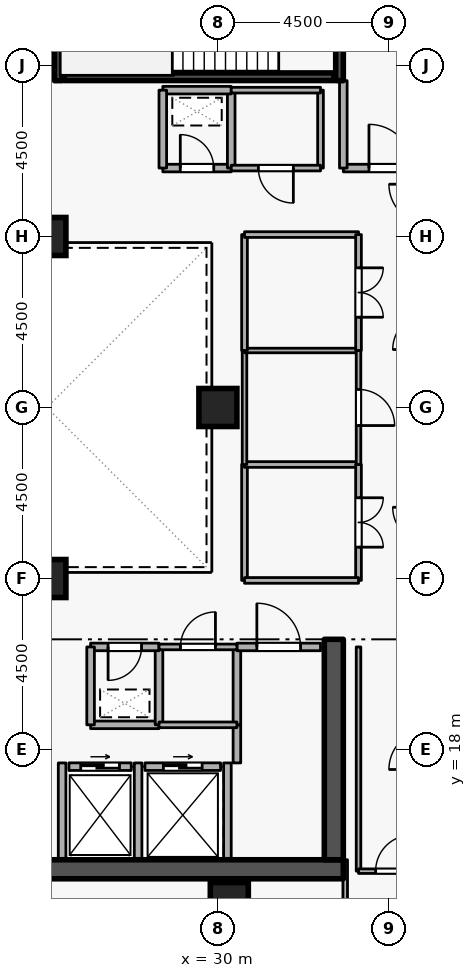
"""IFC4 building model, lengths in metres.
Left out: names, types, materials, properties, quantities, classifications, styles, units other than length and angle.
Written with IfcOpenShell. Run it as: python <this file> out.ifc"""

import sys

from ifc_helpers import new_model, si_unit, direction, frame, frame_2d, origin, origin_2d, place, context, subcontext, project, spatial, rectangle, extrude, element, fill, save


model = new_model("IFC4")
c1 = context("Model", 3, precision=1e-05, world=origin(), true_north=direction((0.0, 1.0)))
c2 = subcontext(c1, "Body", "Model", "MODEL_VIEW")
j1 = project(units=[si_unit("LENGTHUNIT", "METRE"), si_unit("PLANEANGLEUNIT", "RADIAN")], contexts=[c1])
p1 = place(None, origin())
s1 = spatial("IfcSite", under=j1, at=p1, CompositionType="ELEMENT")
p2 = place(p1, origin())
s2 = spatial("IfcBuilding", under=s1, at=p2, CompositionType="ELEMENT")
p3 = place(p2, frame((0.0, 0.0, 247.5)))
s3 = spatial("IfcBuildingStorey", under=s2, at=p3, CompositionType="ELEMENT", Elevation=247.5)
p4 = place(p3, frame((17.7, 14.85, 0.0), z_axis=(0.0, 0.0, 1.0), x_axis=(1.0, 0.0, 0.0)))
e1 = element("IfcWall", 1, at=p4, inside=s3, PredefinedType="SHEAR", context=c2, shape_type="SweptSolid", body=[
    extrude(rectangle(XDim=15.6, YDim=0.5, at=frame_2d((7.8, 0.0))), origin(), (0.0, 0.0, 1.0), 3.6),
])
p5 = place(p3, frame((33.05, 15.1, 0.0), z_axis=(0.0, 0.0, 1.0), x_axis=(0.0, 1.0, 0.0)))
e2 = element("IfcWall", 2, at=p5, inside=s3, PredefinedType="SHEAR", context=c2, shape_type="SweptSolid", body=[
    extrude(rectangle(XDim=5.8, YDim=0.5, at=frame_2d((2.9, 0.0))), origin(), (0.0, 0.0, 1.0), 3.6),
])
for number, where, z_axis, x_axis in (
    (3, (30.3, 14.0, 0.0), (0.0, 0.0, 1.0), (1.0, 0.0, 0.0)),
    (4, (25.5, 22.5, 0.0), (0.0, 0.0, 1.0), (1.0, 0.0, 0.0)),
    (5, (25.5, 31.5, 0.0), (0.0, 0.0, 1.0), (1.0, 0.0, 0.0)),
    (6, (30.0, 27.0, 0.0), (0.0, 0.0, 1.0), (1.0, 0.0, 0.0)),
):
    element("IfcColumn", number, at=place(p3, frame(where, z_axis=z_axis, x_axis=x_axis)), inside=s3, PredefinedType="COLUMN", context=c2, shape_type="SweptSolid", body=[
        extrude(rectangle(XDim=1.0, YDim=1.0, at=origin_2d()), origin(), (0.0, 0.0, 1.0), 3.6),
    ])
p6 = place(p3, frame((26.08, 17.55, 0.0), z_axis=(0.0, 0.0, 1.0), x_axis=(1.0, 0.0, 0.0)))
e7 = element("IfcWall", 7, at=p6, inside=s3, PredefinedType="STANDARD", context=c2, shape_type="SweptSolid", body=[
    extrude(rectangle(XDim=1.64, YDim=0.2, at=frame_2d((0.82, 0.0))), origin(), (0.0, 0.0, 1.0), 3.34),
])
p7 = place(p6, frame((0.31, 0.0, 0.0)))
e8 = element("IfcOpeningElement", 8, at=p7, cuts=e7, PredefinedType="OPENING", context=c2, shape_type="SweptSolid", body=[
    extrude(rectangle(XDim=1.02, YDim=2.06, at=frame_2d((0.51, 1.03))), frame((0.0, 0.11, 0.0), z_axis=(0.0, -1.0, 0.0), x_axis=(1.0, 0.0, 0.0)), (0.0, 0.0, 1.0), 0.22),
])
p8 = place(p3, frame((28.08, 17.55, 0.0), z_axis=(0.0, 0.0, 1.0), x_axis=(1.0, 0.0, 0.0)))
e9 = element("IfcWall", 9, at=p8, inside=s3, PredefinedType="STANDARD", context=c2, shape_type="SweptSolid", body=[
    extrude(rectangle(XDim=1.99, YDim=0.2, at=frame_2d((0.995, 0.0))), origin(), (0.0, 0.0, 1.0), 3.34),
])
p9 = place(p8, frame((0.485, 0.0, 0.0)))
e10 = element("IfcOpeningElement", 10, at=p9, cuts=e9, PredefinedType="OPENING", context=c2, shape_type="SweptSolid", body=[
    extrude(rectangle(XDim=1.02, YDim=2.06, at=frame_2d((0.51, 1.03))), frame((0.0, 0.11, 0.0), z_axis=(0.0, -1.0, 0.0), x_axis=(1.0, 0.0, 0.0)), (0.0, 0.0, 1.0), 0.22),
])
for number, where, z_axis, x_axis in (
    (11, (27.9, 15.112, 0.0), (0.0, 0.0, 1.0), (0.0, 1.0, 0.0)),
    (12, (25.9, 15.112, 0.0), (0.0, 0.0, 1.0), (0.0, 1.0, 0.0)),
    (13, (30.25, 15.112, 0.0), (0.0, 0.0, 1.0), (0.0, 1.0, 0.0)),
):
    element("IfcWall", number, at=place(p3, frame(where, z_axis=z_axis, x_axis=x_axis)), inside=s3, PredefinedType="STANDARD", context=c2, shape_type="SweptSolid", body=[
        extrude(rectangle(XDim=2.536, YDim=0.2, at=frame_2d((1.268, 0.0))), origin(), (0.0, 0.0, 1.0), 3.34),
    ])
p10 = place(p3, frame((33.2, 38.95, 0.0), z_axis=(0.0, 0.0, 1.0), x_axis=(0.0, -1.0, 0.0)))
e14 = element("IfcWall", 14, at=p10, inside=s3, PredefinedType="SHEAR", context=c2, shape_type="SweptSolid", body=[
    extrude(rectangle(XDim=3.35, YDim=0.2, at=frame_2d((1.675, 0.0))), origin(), (0.0, 0.0, 1.0), 3.6),
])
p11 = place(p10, frame((1.125, 0.0, 0.0)))
e15 = element("IfcOpeningElement", 15, at=p11, cuts=e14, PredefinedType="OPENING", context=c2, shape_type="SweptSolid", body=[
    extrude(rectangle(XDim=1.1, YDim=2.1, at=frame_2d((0.55, 1.05))), frame((0.0, 0.11, 0.0), z_axis=(0.0, -1.0, 0.0), x_axis=(1.0, 0.0, 0.0)), (0.0, 0.0, 1.0), 0.22),
])
p12 = place(p3, frame((25.8, 35.6, 0.0), z_axis=(0.0, 0.0, 1.0), x_axis=(0.0, 1.0, 0.0)))
e16 = element("IfcWall", 16, at=p12, inside=s3, PredefinedType="SHEAR", context=c2, shape_type="SweptSolid", body=[
    extrude(rectangle(XDim=3.35, YDim=0.2, at=frame_2d((1.675, 0.0))), origin(), (0.0, 0.0, 1.0), 3.6),
])
p13 = place(p3, frame((25.95, 35.703, 0.0), z_axis=(0.0, 0.0, 1.0), x_axis=(1.0, 0.0, 0.0)))
e17 = element("IfcWall", 17, at=p13, inside=s3, PredefinedType="SHEAR", context=c2, shape_type="SweptSolid", body=[
    extrude(rectangle(XDim=7.1, YDim=0.2, at=frame_2d((3.55, 0.0))), origin(), (0.0, 0.0, 1.0), 3.6),
])
p14 = place(p3, frame((33.3, 33.3, 0.0), z_axis=(0.0, 0.0, 1.0), x_axis=(1.0, 0.0, 0.0)))
e18 = element("IfcWall", 18, at=p14, inside=s3, PredefinedType="STANDARD", context=c2, shape_type="SweptSolid", body=[
    extrude(rectangle(XDim=2.5, YDim=0.2, at=frame_2d((1.25, 0.0))), origin(), (0.0, 0.0, 1.0), 3.34),
])
p15 = place(p14, frame((0.675, 0.0, 0.0)))
e19 = element("IfcOpeningElement", 19, at=p15, cuts=e18, PredefinedType="OPENING", context=c2, shape_type="SweptSolid", body=[
    extrude(rectangle(XDim=1.15, YDim=2.1, at=frame_2d((0.575, 1.05))), frame((0.0, 0.11, 0.0), z_axis=(0.0, -1.0, 0.0), x_axis=(1.0, 0.0, 0.0)), (0.0, 0.0, 1.0), 0.22),
])
p16 = place(p3, frame((33.3, 35.6, 0.0), z_axis=(0.0, 0.0, 1.0), x_axis=(0.0, -1.0, 0.0)))
e20 = element("IfcWall", 20, at=p16, inside=s3, PredefinedType="STANDARD", context=c2, shape_type="SweptSolid", body=[
    extrude(rectangle(XDim=2.3, YDim=0.2, at=frame_2d((1.15, 0.0))), origin(), (0.0, 0.0, 1.0), 2.545),
])
p17 = place(p3, frame((26.65, 18.65, 0.0), z_axis=(0.0, 0.0, 1.0), x_axis=(1.0, 0.0, 0.0)))
e21 = element("IfcWall", 21, at=p17, inside=s3, PredefinedType="STANDARD", context=c2, shape_type="SweptSolid", body=[
    extrude(rectangle(XDim=1.8, YDim=0.2, at=frame_2d((0.9, 0.0))), origin(), (0.0, 0.0, 1.0), 3.34),
])
p18 = place(p3, frame((28.45, 18.65, 0.0), z_axis=(0.0, 0.0, 1.0), x_axis=(0.0, 1.0, 0.0)))
e22 = element("IfcWall", 22, at=p18, inside=s3, PredefinedType="STANDARD", context=c2, shape_type="SweptSolid", body=[
    extrude(rectangle(XDim=2.05, YDim=0.2, at=frame_2d((1.025, 0.0))), origin(), (0.0, 0.0, 1.0), 3.34),
])
p19 = place(p3, frame((28.45, 20.7, 0.0), z_axis=(0.0, 0.0, 1.0), x_axis=(-1.0, 0.0, 0.0)))
e23 = element("IfcWall", 23, at=p19, inside=s3, PredefinedType="STANDARD", context=c2, shape_type="SweptSolid", body=[
    extrude(rectangle(XDim=1.8, YDim=0.2, at=frame_2d((0.9, 0.0))), origin(), (0.0, 0.0, 1.0), 3.34),
])
p20 = place(p19, frame((0.46, 0.0, 0.0)))
e24 = element("IfcOpeningElement", 24, at=p20, cuts=e23, PredefinedType="OPENING", context=c2, shape_type="SweptSolid", body=[
    extrude(rectangle(XDim=0.88, YDim=2.04, at=frame_2d((0.44, 1.02))), frame((0.0, 0.11, 0.0), z_axis=(0.0, -1.0, 0.0), x_axis=(1.0, 0.0, 0.0)), (0.0, 0.0, 1.0), 0.22),
])
p21 = place(p3, frame((26.65, 20.7, 0.0), z_axis=(0.0, 0.0, 1.0), x_axis=(0.0, -1.0, 0.0)))
e25 = element("IfcWall", 25, at=p21, inside=s3, PredefinedType="STANDARD", context=c2, shape_type="SweptSolid", body=[
    extrude(rectangle(XDim=2.05, YDim=0.2, at=frame_2d((1.025, 0.0))), origin(), (0.0, 0.0, 1.0), 3.34),
])
p22 = place(p3, frame((28.55, 33.3, 0.0), z_axis=(0.0, 0.0, 1.0), x_axis=(1.0, 0.0, 0.0)))
e26 = element("IfcWall", 26, at=p22, inside=s3, PredefinedType="STANDARD", context=c2, shape_type="SweptSolid", body=[
    extrude(rectangle(XDim=1.8, YDim=0.2, at=frame_2d((0.9, 0.0))), origin(), (0.0, 0.0, 1.0), 3.34),
])
p23 = place(p22, frame((0.46, 0.0, 0.0)))
e27 = element("IfcOpeningElement", 27, at=p23, cuts=e26, PredefinedType="OPENING", context=c2, shape_type="SweptSolid", body=[
    extrude(rectangle(XDim=0.88, YDim=2.04, at=frame_2d((0.44, 1.02))), frame((0.0, 0.11, 0.0), z_axis=(0.0, -1.0, 0.0), x_axis=(1.0, 0.0, 0.0)), (0.0, 0.0, 1.0), 0.22),
])
p24 = place(p3, frame((30.35, 33.3, 0.0), z_axis=(0.0, 0.0, 1.0), x_axis=(0.0, 1.0, 0.0)))
e28 = element("IfcWall", 28, at=p24, inside=s3, PredefinedType="STANDARD", context=c2, shape_type="SweptSolid", body=[
    extrude(rectangle(XDim=2.05, YDim=0.2, at=frame_2d((1.025, 0.0))), origin(), (0.0, 0.0, 1.0), 3.34),
])
p25 = place(p3, frame((30.35, 35.35, 0.0), z_axis=(0.0, 0.0, 1.0), x_axis=(-1.0, 0.0, 0.0)))
e29 = element("IfcWall", 29, at=p25, inside=s3, PredefinedType="STANDARD", context=c2, shape_type="SweptSolid", body=[
    extrude(rectangle(XDim=1.8, YDim=0.2, at=frame_2d((0.9, 0.0))), origin(), (0.0, 0.0, 1.0), 3.34),
])
p26 = place(p3, frame((28.55, 35.35, 0.0), z_axis=(0.0, 0.0, 1.0), x_axis=(0.0, -1.0, 0.0)))
e30 = element("IfcWall", 30, at=p26, inside=s3, PredefinedType="STANDARD", context=c2, shape_type="SweptSolid", body=[
    extrude(rectangle(XDim=2.05, YDim=0.2, at=frame_2d((1.025, 0.0))), origin(), (0.0, 0.0, 1.0), 3.34),
])
p27 = place(p3, frame((30.5, 17.648, 0.0), z_axis=(0.0, 0.0, 1.0), x_axis=(0.0, 1.0, 0.0)))
e31 = element("IfcWall", 31, at=p27, inside=s3, PredefinedType="STANDARD", context=c2, shape_type="SweptSolid", body=[
    extrude(rectangle(XDim=1.002, YDim=0.2, at=frame_2d((0.501, 0.0))), origin(), (0.0, 0.0, 1.0), 3.34),
])
p28 = place(p3, frame((30.5, 18.65, 0.0), z_axis=(0.0, 0.0, 1.0), x_axis=(0.0, 1.0, 0.0)))
e32 = element("IfcWall", 32, at=p28, inside=s3, PredefinedType="STANDARD", context=c2, shape_type="SweptSolid", body=[
    extrude(rectangle(XDim=2.05, YDim=0.2, at=frame_2d((1.025, 0.0))), origin(), (0.0, 0.0, 1.0), 3.34),
])
p29 = place(p3, frame((30.5, 20.7, 0.0), z_axis=(0.0, 0.0, 1.0), x_axis=(1.0, 0.0, 0.0)))
e33 = element("IfcWall", 33, at=p29, inside=s3, PredefinedType="STANDARD", context=c2, shape_type="SweptSolid", body=[
    extrude(rectangle(XDim=2.2, YDim=0.2, at=frame_2d((1.1, 0.0))), origin(), (0.0, 0.0, 1.0), 3.34),
])
p30 = place(p29, frame((0.525, 0.0, 0.0)))
e34 = element("IfcOpeningElement", 34, at=p30, cuts=e33, PredefinedType="OPENING", context=c2, shape_type="SweptSolid", body=[
    extrude(rectangle(XDim=1.15, YDim=2.1, at=frame_2d((0.575, 1.05))), frame((0.0, 0.11, 0.0), z_axis=(0.0, -1.0, 0.0), x_axis=(1.0, 0.0, 0.0)), (0.0, 0.0, 1.0), 0.22),
])
p31 = place(p3, frame((30.5, 18.65, 0.0), z_axis=(0.0, 0.0, 1.0), x_axis=(-1.0, 0.0, 0.0)))
e35 = element("IfcWall", 35, at=p31, inside=s3, PredefinedType="PARTITIONING", context=c2, shape_type="SweptSolid", body=[
    extrude(rectangle(XDim=2.05, YDim=0.15, at=frame_2d((1.025, 0.0))), origin(), (0.0, 0.0, 1.0), 3.34),
])
p32 = place(p3, frame((28.45, 20.7, 0.0), z_axis=(0.0, 0.0, 1.0), x_axis=(1.0, 0.0, 0.0)))
e36 = element("IfcWall", 36, at=p32, inside=s3, PredefinedType="PARTITIONING", context=c2, shape_type="SweptSolid", body=[
    extrude(rectangle(XDim=2.05, YDim=0.15, at=frame_2d((1.025, 0.0))), origin(), (0.0, 0.0, 1.0), 3.34),
])
p33 = place(p32, frame((0.565, 0.0, 0.0)))
e37 = element("IfcOpeningElement", 37, at=p33, cuts=e36, PredefinedType="OPENING", context=c2, shape_type="SweptSolid", body=[
    extrude(rectangle(XDim=0.92, YDim=2.08, at=frame_2d((0.46, 1.04))), frame((0.0, 0.085, 0.0), z_axis=(0.0, -1.0, 0.0), x_axis=(1.0, 0.0, 0.0)), (0.0, 0.0, 1.0), 0.17),
])
p34 = place(p3, frame((32.7, 35.35, 0.0), z_axis=(0.0, 0.0, 1.0), x_axis=(0.0, -1.0, 0.0)))
e38 = element("IfcWall", 38, at=p34, inside=s3, PredefinedType="PARTITIONING", context=c2, shape_type="SweptSolid", body=[
    extrude(rectangle(XDim=2.05, YDim=0.15, at=frame_2d((1.025, 0.0))), origin(), (0.0, 0.0, 1.0), 2.545),
])
p35 = place(p3, frame((32.7, 33.3, 0.0), z_axis=(0.0, 0.0, 1.0), x_axis=(-1.0, 0.0, 0.0)))
e39 = element("IfcWall", 39, at=p35, inside=s3, PredefinedType="PARTITIONING", context=c2, shape_type="SweptSolid", body=[
    extrude(rectangle(XDim=2.35, YDim=0.15, at=frame_2d((1.175, 0.0))), origin(), (0.0, 0.0, 1.0), 3.34),
])
p36 = place(p35, frame((0.715, 0.0, 0.0)))
e40 = element("IfcOpeningElement", 40, at=p36, cuts=e39, PredefinedType="OPENING", context=c2, shape_type="SweptSolid", body=[
    extrude(rectangle(XDim=0.92, YDim=2.08, at=frame_2d((0.46, 1.04))), frame((0.0, 0.085, 0.0), z_axis=(0.0, -1.0, 0.0), x_axis=(1.0, 0.0, 0.0)), (0.0, 0.0, 1.0), 0.17),
])
p37 = place(p3, frame((30.35, 35.35, 0.0), z_axis=(0.0, 0.0, 1.0), x_axis=(1.0, 0.0, 0.0)))
e41 = element("IfcWall", 41, at=p37, inside=s3, PredefinedType="PARTITIONING", context=c2, shape_type="SweptSolid", body=[
    extrude(rectangle(XDim=2.35, YDim=0.15, at=frame_2d((1.175, 0.0))), origin(), (0.0, 0.0, 1.0), 3.34),
])
p38 = place(p3, frame((33.7, 20.7, 0.0), z_axis=(0.0, 0.0, 1.0), x_axis=(0.0, -1.0, 0.0)))
e42 = element("IfcWall", 42, at=p38, inside=s3, PredefinedType="PARTITIONING", context=c2, shape_type="SweptSolid", body=[
    extrude(rectangle(XDim=5.9, YDim=0.12, at=frame_2d((2.95, 0.0))), origin(), (0.0, 0.0, 1.0), 3.34),
])
p39 = place(p3, frame((33.7, 14.8, 0.0), z_axis=(0.0, 0.0, 1.0), x_axis=(1.0, 0.0, 0.0)))
e43 = element("IfcWall", 43, at=p39, inside=s3, PredefinedType="PARTITIONING", context=c2, shape_type="SweptSolid", body=[
    extrude(rectangle(XDim=1.85, YDim=0.12, at=frame_2d((0.925, 0.0))), origin(), (0.0, 0.0, 1.0), 3.34),
])
p40 = place(p39, frame((0.45, 0.0, 0.0)))
e44 = element("IfcOpeningElement", 44, at=p40, cuts=e43, PredefinedType="OPENING", context=c2, shape_type="SweptSolid", body=[
    extrude(rectangle(XDim=0.95, YDim=2.1, at=frame_2d((0.475, 1.05))), frame((0.0, 0.07, 0.0), z_axis=(0.0, -1.0, 0.0), x_axis=(1.0, 0.0, 0.0)), (0.0, 0.0, 1.0), 0.14),
])
p41 = place(p3, frame((33.35, 3.28, 0.0), z_axis=(0.0, 0.0, 1.0), x_axis=(0.0, 1.0, 0.0)))
e45 = element("IfcWall", 45, at=p41, inside=s3, PredefinedType="PARTITIONING", context=c2, shape_type="SweptSolid", body=[
    extrude(rectangle(XDim=11.82, YDim=0.12, at=frame_2d((5.91, 0.0))), origin(), (0.0, 0.0, 1.0), 2.545),
])
p42 = place(p3, frame((30.7, 22.45, 0.0), z_axis=(0.0, 0.0, 1.0), x_axis=(0.0, 1.0, 0.0)))
e46 = element("IfcWall", 46, at=p42, inside=s3, PredefinedType="PARTITIONING", context=c2, shape_type="SweptSolid", body=[
    extrude(rectangle(XDim=3.05, YDim=0.15, at=frame_2d((1.525, 0.0))), origin(), (0.0, 0.0, 1.0), 3.34),
])
p43 = place(p3, frame((30.7, 25.5, 0.0), z_axis=(0.0, 0.0, 1.0), x_axis=(1.0, 0.0, 0.0)))
e47 = element("IfcWall", 47, at=p43, inside=s3, PredefinedType="PARTITIONING", context=c2, shape_type="SweptSolid", body=[
    extrude(rectangle(XDim=3.0, YDim=0.15, at=frame_2d((1.5, 0.0))), origin(), (0.0, 0.0, 1.0), 3.34),
])
p44 = place(p3, frame((33.7, 25.5, 0.0), z_axis=(0.0, 0.0, 1.0), x_axis=(0.0, -1.0, 0.0)))
e48 = element("IfcWall", 48, at=p44, inside=s3, PredefinedType="PARTITIONING", context=c2, shape_type="SweptSolid", body=[
    extrude(rectangle(XDim=3.05, YDim=0.15, at=frame_2d((1.525, 0.0))), origin(), (0.0, 0.0, 1.0), 3.34),
])
p45 = place(p44, frame((0.875, 0.0, 0.0)))
e49 = element("IfcOpeningElement", 49, at=p45, cuts=e48, PredefinedType="OPENING", context=c2, shape_type="SweptSolid", body=[
    extrude(rectangle(XDim=1.3, YDim=2.12, at=frame_2d((0.65, 1.06))), frame((0.0, 0.085, 0.0), z_axis=(0.0, -1.0, 0.0), x_axis=(1.0, 0.0, 0.0)), (0.0, 0.0, 1.0), 0.17),
])
p46 = place(p3, frame((33.7, 22.45, 0.0), z_axis=(0.0, 0.0, 1.0), x_axis=(-1.0, 0.0, 0.0)))
e50 = element("IfcWall", 50, at=p46, inside=s3, PredefinedType="PARTITIONING", context=c2, shape_type="SweptSolid", body=[
    extrude(rectangle(XDim=3.0, YDim=0.15, at=frame_2d((1.5, 0.0))), origin(), (0.0, 0.0, 1.0), 3.34),
])
for number, where, z_axis, x_axis in (
    (51, (30.7, 25.5, 0.0), (0.0, 0.0, 1.0), (0.0, 1.0, 0.0)),
    (52, (30.7, 28.5, 0.0), (0.0, 0.0, 1.0), (1.0, 0.0, 0.0)),
):
    element("IfcWall", number, at=place(p3, frame(where, z_axis=z_axis, x_axis=x_axis)), inside=s3, PredefinedType="PARTITIONING", context=c2, shape_type="SweptSolid", body=[
        extrude(rectangle(XDim=3.0, YDim=0.12, at=frame_2d((1.5, 0.0))), origin(), (0.0, 0.0, 1.0), 3.34),
    ])
p47 = place(p3, frame((33.7, 28.5, 0.0), z_axis=(0.0, 0.0, 1.0), x_axis=(0.0, -1.0, 0.0)))
e53 = element("IfcWall", 53, at=p47, inside=s3, PredefinedType="PARTITIONING", context=c2, shape_type="SweptSolid", body=[
    extrude(rectangle(XDim=3.0, YDim=0.12, at=frame_2d((1.5, 0.0))), origin(), (0.0, 0.0, 1.0), 3.34),
])
p48 = place(p47, frame((1.025, 0.0, 0.0)))
e54 = element("IfcOpeningElement", 54, at=p48, cuts=e53, PredefinedType="OPENING", context=c2, shape_type="SweptSolid", body=[
    extrude(rectangle(XDim=0.95, YDim=2.1, at=frame_2d((0.475, 1.05))), frame((0.0, 0.07, 0.0), z_axis=(0.0, -1.0, 0.0), x_axis=(1.0, 0.0, 0.0)), (0.0, 0.0, 1.0), 0.14),
])
p49 = place(p3, frame((30.7, 28.5, 0.0), z_axis=(0.0, 0.0, 1.0), x_axis=(0.0, 1.0, 0.0)))
e55 = element("IfcWall", 55, at=p49, inside=s3, PredefinedType="PARTITIONING", context=c2, shape_type="SweptSolid", body=[
    extrude(rectangle(XDim=3.05, YDim=0.15, at=frame_2d((1.525, 0.0))), origin(), (0.0, 0.0, 1.0), 3.34),
])
p50 = place(p3, frame((30.7, 31.55, 0.0), z_axis=(0.0, 0.0, 1.0), x_axis=(1.0, 0.0, 0.0)))
e56 = element("IfcWall", 56, at=p50, inside=s3, PredefinedType="PARTITIONING", context=c2, shape_type="SweptSolid", body=[
    extrude(rectangle(XDim=3.0, YDim=0.15, at=frame_2d((1.5, 0.0))), origin(), (0.0, 0.0, 1.0), 3.34),
])
p51 = place(p3, frame((33.7, 31.55, 0.0), z_axis=(0.0, 0.0, 1.0), x_axis=(0.0, -1.0, 0.0)))
e57 = element("IfcWall", 57, at=p51, inside=s3, PredefinedType="PARTITIONING", context=c2, shape_type="SweptSolid", body=[
    extrude(rectangle(XDim=3.05, YDim=0.15, at=frame_2d((1.525, 0.0))), origin(), (0.0, 0.0, 1.0), 3.34),
])
p52 = place(p51, frame((0.875, 0.0, 0.0)))
e58 = element("IfcOpeningElement", 58, at=p52, cuts=e57, PredefinedType="OPENING", context=c2, shape_type="SweptSolid", body=[
    extrude(rectangle(XDim=1.3, YDim=2.12, at=frame_2d((0.65, 1.06))), frame((0.0, 0.085, 0.0), z_axis=(0.0, -1.0, 0.0), x_axis=(1.0, 0.0, 0.0)), (0.0, 0.0, 1.0), 0.17),
])
p53 = place(p7, origin())
e59 = element("IfcDoor", 59, at=p53, inside=s3, OperationType="SLIDING_TO_LEFT", PredefinedType="DOOR", context=c2, shape_type="SweptSolid", body=[
    extrude(rectangle(XDim=1.02, YDim=2.06, at=frame_2d((0.51, 1.03))), frame((0.0, 0.025, 0.0), z_axis=(0.0, -1.0, 0.0), x_axis=(1.0, 0.0, 0.0)), (0.0, 0.0, 1.0), 0.05),
])
fill(e8, e59)
p54 = place(p9, origin())
e60 = element("IfcDoor", 60, at=p54, inside=s3, OperationType="SLIDING_TO_LEFT", PredefinedType="DOOR", context=c2, shape_type="SweptSolid", body=[
    extrude(rectangle(XDim=1.02, YDim=2.06, at=frame_2d((0.51, 1.03))), frame((0.0, 0.025, 0.0), z_axis=(0.0, -1.0, 0.0), x_axis=(1.0, 0.0, 0.0)), (0.0, 0.0, 1.0), 0.05),
])
fill(e10, e60)
p55 = place(p15, origin())
e61 = element("IfcDoor", 61, at=p55, inside=s3, OperationType="SINGLE_SWING_LEFT", PredefinedType="DOOR", context=c2, shape_type="SweptSolid", body=[
    extrude(rectangle(XDim=1.15, YDim=2.1, at=frame_2d((0.575, 1.05))), frame((0.0, 0.025, 0.0), z_axis=(0.0, -1.0, 0.0), x_axis=(1.0, 0.0, 0.0)), (0.0, 0.0, 1.0), 0.05),
])
fill(e19, e61)
p56 = place(p20, origin())
e62 = element("IfcDoor", 62, at=p56, inside=s3, OperationType="SINGLE_SWING_RIGHT", PredefinedType="DOOR", context=c2, shape_type="SweptSolid", body=[
    extrude(rectangle(XDim=0.88, YDim=2.04, at=frame_2d((0.44, 1.02))), frame((0.0, 0.025, 0.0), z_axis=(0.0, -1.0, 0.0), x_axis=(1.0, 0.0, 0.0)), (0.0, 0.0, 1.0), 0.05),
])
fill(e24, e62)
p57 = place(p23, origin())
e63 = element("IfcDoor", 63, at=p57, inside=s3, OperationType="SINGLE_SWING_LEFT", PredefinedType="DOOR", context=c2, shape_type="SweptSolid", body=[
    extrude(rectangle(XDim=0.88, YDim=2.04, at=frame_2d((0.44, 1.02))), frame((0.0, 0.025, 0.0), z_axis=(0.0, -1.0, 0.0), x_axis=(1.0, 0.0, 0.0)), (0.0, 0.0, 1.0), 0.05),
])
fill(e27, e63)
p58 = place(p33, origin())
e64 = element("IfcDoor", 64, at=p58, inside=s3, OperationType="SINGLE_SWING_RIGHT", PredefinedType="DOOR", context=c2, shape_type="SweptSolid", body=[
    extrude(rectangle(XDim=0.92, YDim=2.08, at=frame_2d((0.46, 1.04))), frame((0.0, 0.025, 0.0), z_axis=(0.0, -1.0, 0.0), x_axis=(1.0, 0.0, 0.0)), (0.0, 0.0, 1.0), 0.05),
])
fill(e37, e64)
p59 = place(p30, origin())
e65 = element("IfcDoor", 65, at=p59, inside=s3, OperationType="SINGLE_SWING_LEFT", PredefinedType="DOOR", context=c2, shape_type="SweptSolid", body=[
    extrude(rectangle(XDim=1.15, YDim=2.1, at=frame_2d((0.575, 1.05))), frame((0.0, 0.025, 0.0), z_axis=(0.0, -1.0, 0.0), x_axis=(1.0, 0.0, 0.0)), (0.0, 0.0, 1.0), 0.05),
])
fill(e34, e65)
p60 = place(p36, origin())
e66 = element("IfcDoor", 66, at=p60, inside=s3, OperationType="SINGLE_SWING_LEFT", PredefinedType="DOOR", context=c2, shape_type="SweptSolid", body=[
    extrude(rectangle(XDim=0.92, YDim=2.08, at=frame_2d((0.46, 1.04))), frame((0.0, 0.025, 0.0), z_axis=(0.0, -1.0, 0.0), x_axis=(1.0, 0.0, 0.0)), (0.0, 0.0, 1.0), 0.05),
])
fill(e40, e66)
p61 = place(p40, origin())
e67 = element("IfcDoor", 67, at=p61, inside=s3, OperationType="SINGLE_SWING_RIGHT", PredefinedType="DOOR", context=c2, shape_type="SweptSolid", body=[
    extrude(rectangle(XDim=0.95, YDim=2.1, at=frame_2d((0.475, 1.05))), frame((0.0, 0.025, 0.0), z_axis=(0.0, -1.0, 0.0), x_axis=(1.0, 0.0, 0.0)), (0.0, 0.0, 1.0), 0.05),
])
fill(e44, e67)
p62 = place(p45, origin())
e68 = element("IfcDoor", 68, at=p62, inside=s3, OperationType="DOUBLE_DOOR_SINGLE_SWING", PredefinedType="DOOR", context=c2, shape_type="SweptSolid", body=[
    extrude(rectangle(XDim=1.3, YDim=2.12, at=frame_2d((0.65, 1.06))), frame((0.0, 0.025, 0.0), z_axis=(0.0, -1.0, 0.0), x_axis=(1.0, 0.0, 0.0)), (0.0, 0.0, 1.0), 0.05),
])
fill(e49, e68)
p63 = place(p48, origin())
e69 = element("IfcDoor", 69, at=p63, inside=s3, OperationType="SINGLE_SWING_RIGHT", PredefinedType="DOOR", context=c2, shape_type="SweptSolid", body=[
    extrude(rectangle(XDim=0.95, YDim=2.1, at=frame_2d((0.475, 1.05))), frame((0.0, 0.025, 0.0), z_axis=(0.0, -1.0, 0.0), x_axis=(1.0, 0.0, 0.0)), (0.0, 0.0, 1.0), 0.05),
])
fill(e54, e69)
p64 = place(p52, origin())
e70 = element("IfcDoor", 70, at=p64, inside=s3, OperationType="DOUBLE_DOOR_SINGLE_SWING", PredefinedType="DOOR", context=c2, shape_type="SweptSolid", body=[
    extrude(rectangle(XDim=1.3, YDim=2.12, at=frame_2d((0.65, 1.06))), frame((0.0, 0.025, 0.0), z_axis=(0.0, -1.0, 0.0), x_axis=(1.0, 0.0, 0.0)), (0.0, 0.0, 1.0), 0.05),
])
fill(e58, e70)
save(model, sys.argv[1])
